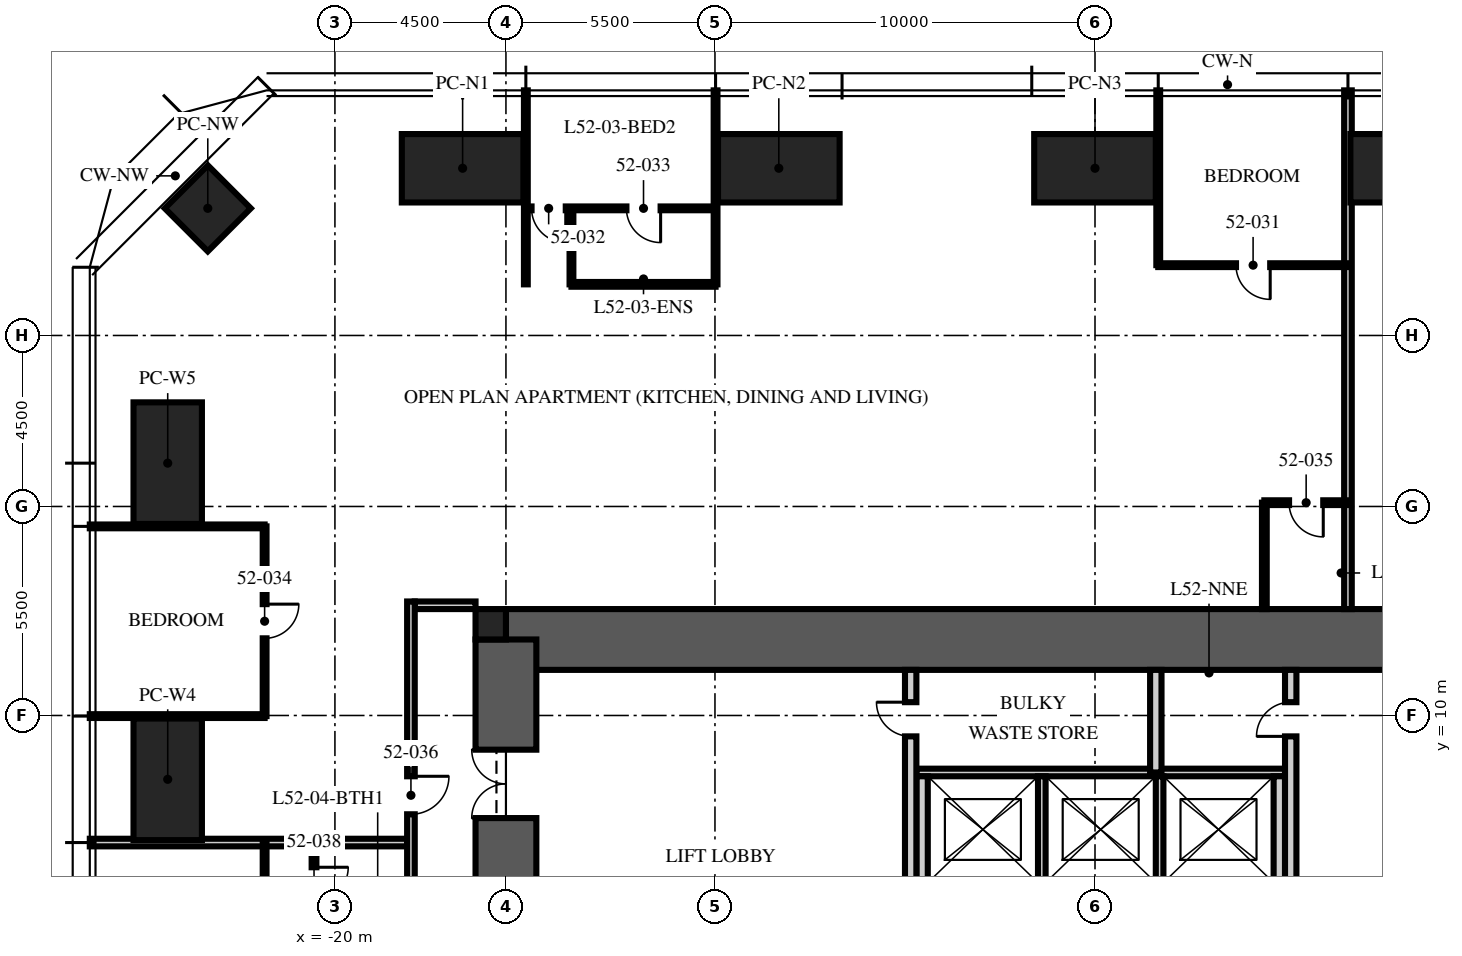
"""IFC4 building model, lengths in metres.
Left out: names, types, materials, properties, quantities, classifications, styles, units other than length and angle.
Written with IfcOpenShell. Run it as: python <this file> out.ifc"""

import sys

from ifc_helpers import new_model, si_unit, direction, frame, frame_2d, origin, origin_2d, place, context, subcontext, project, spatial, rectangle, hollow_rectangle, extrude, element, fill, save


model = new_model("IFC4")
c1 = context("Model", 3, precision=1e-05, world=origin(), true_north=direction((0.0, 1.0)))
c2 = subcontext(c1, "Body", "Model", "MODEL_VIEW")
j1 = project(units=[si_unit("LENGTHUNIT", "METRE"), si_unit("PLANEANGLEUNIT", "RADIAN")], contexts=[c1])
p1 = place(None, origin())
s1 = spatial("IfcSite", under=j1, at=p1, CompositionType="ELEMENT")
p2 = place(p1, origin())
s2 = spatial("IfcBuilding", under=s1, at=p2, CompositionType="ELEMENT")
p3 = place(p2, frame((0.0, 0.0, 210.75)))
s3 = spatial("IfcBuildingStorey", under=s2, at=p3, CompositionType="ELEMENT", Elevation=210.75)
p4 = place(p3, frame((-15.5, 12.0, -0.25), z_axis=(0.0, 0.0, 1.0), x_axis=(1.0, 0.0, 0.0)))
e1 = element("IfcWall", 1, at=p4, inside=s3, PredefinedType="SHEAR", context=c2, shape_type="SweptSolid", body=[
    extrude(rectangle(XDim=31.0, YDim=1.6, at=frame_2d((15.5, 0.0))), origin(), (0.0, 0.0, 1.0), 3.75),
])
p5 = place(p3, frame((-15.5, -12.0, -0.25), z_axis=(0.0, 0.0, 1.0), x_axis=(0.0, 1.0, 0.0)))
e2 = element("IfcWall", 2, at=p5, inside=s3, PredefinedType="SHEAR", context=c2, shape_type="SweptSolid", body=[
    extrude(rectangle(XDim=24.0, YDim=1.6, at=frame_2d((12.0, 0.0))), origin(), (0.0, 0.0, 1.0), 3.75),
])
p6 = place(p5, frame((3.2, 0.0, 0.25)))
e3 = element("IfcOpeningElement", 3, at=p6, cuts=e2, PredefinedType="OPENING", context=c2, shape_type="SweptSolid", body=[
    extrude(rectangle(XDim=1.2, YDim=2.1, at=frame_2d((0.6, 1.05))), frame((0.0, 0.81, 0.0), z_axis=(0.0, -1.0, 0.0), x_axis=(1.0, 0.0, 0.0)), (0.0, 0.0, 1.0), 1.62),
])
p7 = place(p5, frame((19.3, 0.0, 0.25)))
e4 = element("IfcOpeningElement", 4, at=p7, cuts=e2, PredefinedType="OPENING", context=c2, shape_type="SweptSolid", body=[
    extrude(rectangle(XDim=1.8, YDim=2.1, at=frame_2d((0.9, 1.05))), frame((0.0, 0.81, 0.0), z_axis=(0.0, -1.0, 0.0), x_axis=(1.0, 0.0, 0.0)), (0.0, 0.0, 1.0), 1.62),
])
p8 = place(p3, frame((-15.9, 12.4, -0.25), z_axis=(0.0, 0.0, 1.0), x_axis=(1.0, 0.0, 0.0)))
e5 = element("IfcColumn", 5, at=p8, inside=s3, PredefinedType="COLUMN", context=c2, shape_type="SweptSolid", body=[
    extrude(rectangle(XDim=0.8, YDim=0.8, at=origin_2d()), origin(), (0.0, 0.0, 1.0), 3.75),
])
for number, where, z_axis, x_axis in (
    (6, (-16.64, 24.4, 0.0), (0.0, 0.0, 1.0), (1.0, 0.0, 0.0)),
    (7, (-8.32, 24.4, 0.0), (0.0, 0.0, 1.0), (1.0, 0.0, 0.0)),
    (8, (0.0, 24.4, 0.0), (0.0, 0.0, 1.0), (1.0, 0.0, 0.0)),
    (9, (8.32, 24.4, 0.0), (0.0, 0.0, 1.0), (1.0, 0.0, 0.0)),
    (10, (-24.4, 8.32, 0.0), (0.0, 0.0, 1.0), (0.0, 1.0, 0.0)),
    (11, (-24.4, 16.64, 0.0), (0.0, 0.0, 1.0), (0.0, 1.0, 0.0)),
):
    element("IfcColumn", number, at=place(p3, frame(where, z_axis=z_axis, x_axis=x_axis)), inside=s3, PredefinedType="COLUMN", context=c2, shape_type="SweptSolid", body=[
        extrude(hollow_rectangle(XDim=3.2, YDim=1.8, WallThickness=0.2, at=origin_2d()), origin(), (0.0, 0.0, 1.0), 3.75),
    ])
p9 = place(p3, frame((-23.346, 23.346, 0.0), z_axis=(0.0, 0.0, 1.0), x_axis=(0.707106781187, 0.707106781187, 0.0)))
e12 = element("IfcColumn", 12, at=p9, inside=s3, PredefinedType="COLUMN", context=c2, shape_type="SweptSolid", body=[
    extrude(hollow_rectangle(XDim=1.6, YDim=1.6, WallThickness=0.1, at=origin_2d()), origin(), (0.0, 0.0, 1.0), 3.75),
])
p10 = place(p3, frame((-4.7, 8.5, 0.0), z_axis=(0.0, 0.0, 1.0), x_axis=(1.0, 0.0, 0.0)))
e13 = element("IfcWall", 13, at=p10, inside=s3, PredefinedType="PARTITIONING", context=c2, shape_type="SweptSolid", body=[
    extrude(rectangle(XDim=9.7, YDim=0.2, at=frame_2d((4.85, 0.0))), origin(), (0.0, 0.0, 1.0), 3.5),
])
for number, where, z_axis, x_axis in (
    (14, (-4.55, 5.6, 0.0), (0.0, 0.0, 1.0), (0.0, 1.0, 0.0)),
    (15, (4.85, 5.6, 0.0), (0.0, 0.0, 1.0), (0.0, 1.0, 0.0)),
):
    element("IfcWall", number, at=place(p3, frame(where, z_axis=z_axis, x_axis=x_axis)), inside=s3, PredefinedType="PARTITIONING", context=c2, shape_type="SweptSolid", body=[
        extrude(rectangle(XDim=2.8, YDim=0.3, at=frame_2d((1.4, 0.0))), origin(), (0.0, 0.0, 1.0), 3.5),
    ])
for number, where, z_axis, x_axis in (
    (16, (-1.4, 5.6, 0.0), (0.0, 0.0, 1.0), (0.0, 1.0, 0.0)),
    (17, (1.7, 5.6, 0.0), (0.0, 0.0, 1.0), (0.0, 1.0, 0.0)),
):
    element("IfcWall", number, at=place(p3, frame(where, z_axis=z_axis, x_axis=x_axis)), inside=s3, PredefinedType="PARTITIONING", context=c2, shape_type="SweptSolid", body=[
        extrude(rectangle(XDim=2.8, YDim=0.2, at=frame_2d((1.4, 0.0))), origin(), (0.0, 0.0, 1.0), 3.5),
    ])
p11 = place(p3, frame((-4.85, 5.3, 0.0), z_axis=(0.0, 0.0, 1.0), x_axis=(0.0, 1.0, 0.0)))
e18 = element("IfcWall", 18, at=p11, inside=s3, PredefinedType="PARTITIONING", context=c2, shape_type="SweptSolid", body=[
    extrude(rectangle(XDim=5.9, YDim=0.3, at=frame_2d((2.95, 0.0))), origin(), (0.0, 0.0, 1.0), 3.5),
])
p12 = place(p11, frame((4.15, 0.0, 0.0)))
e19 = element("IfcOpeningElement", 19, at=p12, cuts=e18, PredefinedType="OPENING", context=c2, shape_type="SweptSolid", body=[
    extrude(rectangle(XDim=0.9, YDim=2.1, at=frame_2d((0.45, 1.05))), frame((0.0, 0.16, 0.0), z_axis=(0.0, -1.0, 0.0), x_axis=(1.0, 0.0, 0.0)), (0.0, 0.0, 1.0), 0.32),
])
p13 = place(p3, frame((5.15, 5.3, 0.0), z_axis=(0.0, 0.0, 1.0), x_axis=(0.0, 1.0, 0.0)))
e20 = element("IfcWall", 20, at=p13, inside=s3, PredefinedType="PARTITIONING", context=c2, shape_type="SweptSolid", body=[
    extrude(rectangle(XDim=5.9, YDim=0.3, at=frame_2d((2.95, 0.0))), origin(), (0.0, 0.0, 1.0), 3.5),
])
p14 = place(p13, frame((4.15, 0.0, 0.0)))
e21 = element("IfcOpeningElement", 21, at=p14, cuts=e20, PredefinedType="OPENING", context=c2, shape_type="SweptSolid", body=[
    extrude(rectangle(XDim=0.9, YDim=2.1, at=frame_2d((0.45, 1.05))), frame((0.0, 0.16, 0.0), z_axis=(0.0, -1.0, 0.0), x_axis=(1.0, 0.0, 0.0)), (0.0, 0.0, 1.0), 0.32),
])
p15 = place(p3, frame((1.6, 8.5, 0.0), z_axis=(0.0, 0.0, 1.0), x_axis=(0.0, 1.0, 0.0)))
e22 = element("IfcWall", 22, at=p15, inside=s3, PredefinedType="PARTITIONING", context=c2, shape_type="SweptSolid", body=[
    extrude(rectangle(XDim=2.7, YDim=0.3, at=frame_2d((1.35, 0.0))), origin(), (0.0, 0.0, 1.0), 3.5),
])
p16 = place(p3, frame((-16.3, 12.9, 0.0), z_axis=(0.0, 0.0, 1.0), x_axis=(-1.0, 0.0, 0.0)))
e23 = element("IfcWall", 23, at=p16, inside=s3, PredefinedType="PARTITIONING", context=c2, shape_type="SweptSolid", body=[
    extrude(rectangle(XDim=1.6, YDim=0.2, at=frame_2d((0.8, 0.0))), origin(), (0.0, 0.0, 1.0), 2.3),
])
p17 = place(p3, frame((6.656, 12.8, 0.0), z_axis=(0.0, 0.0, 1.0), x_axis=(0.0, 1.0, 0.0)))
e24 = element("IfcWall", 24, at=p17, inside=s3, PredefinedType="PARTITIONING", context=c2, shape_type="SweptSolid", body=[
    extrude(rectangle(XDim=13.65, YDim=0.2, at=frame_2d((6.825, 0.0))), origin(), (0.0, 0.0, 1.0), 2.91),
])
p18 = place(p3, frame((1.664, 21.85, 0.0), z_axis=(0.0, 0.0, 1.0), x_axis=(0.0, 1.0, 0.0)))
e25 = element("IfcWall", 25, at=p18, inside=s3, PredefinedType="PARTITIONING", context=c2, shape_type="SweptSolid", body=[
    extrude(rectangle(XDim=4.6, YDim=0.1, at=frame_2d((2.3, 0.0))), origin(), (0.0, 0.0, 1.0), 2.91),
])
for number, where, z_axis, x_axis in (
    (26, (-9.984, 21.345, 0.0), (0.0, 0.0, 1.0), (0.0, 1.0, 0.0)),
    (27, (-14.976, 21.345, 0.0), (0.0, 0.0, 1.0), (0.0, 1.0, 0.0)),
):
    element("IfcWall", number, at=place(p3, frame(where, z_axis=z_axis, x_axis=x_axis)), inside=s3, PredefinedType="PARTITIONING", context=c2, shape_type="SweptSolid", body=[
        extrude(rectangle(XDim=5.105, YDim=0.1, at=frame_2d((2.552, 0.0))), origin(), (0.0, 0.0, 1.0), 2.91),
    ])
for number, where, z_axis, x_axis in (
    (28, (-21.85, 14.976, 0.0), (0.0, 0.0, 1.0), (-1.0, 0.0, 0.0)),
    (29, (-21.85, 9.984, 0.0), (0.0, 0.0, 1.0), (-1.0, 0.0, 0.0)),
):
    element("IfcWall", number, at=place(p3, frame(where, z_axis=z_axis, x_axis=x_axis)), inside=s3, PredefinedType="PARTITIONING", context=c2, shape_type="SweptSolid", body=[
        extrude(rectangle(XDim=4.6, YDim=0.1, at=frame_2d((2.3, 0.0))), origin(), (0.0, 0.0, 1.0), 2.91),
    ])
p19 = place(p3, frame((-18.1, 6.656, 0.0), z_axis=(0.0, 0.0, 1.0), x_axis=(-1.0, 0.0, 0.0)))
e30 = element("IfcWall", 30, at=p19, inside=s3, PredefinedType="PARTITIONING", context=c2, shape_type="SweptSolid", body=[
    extrude(rectangle(XDim=8.35, YDim=0.2, at=frame_2d((4.175, 0.0))), origin(), (0.0, 0.0, 1.0), 2.91),
])
p20 = place(p3, frame((6.656, 21.85, 0.0), z_axis=(0.0, 0.0, 1.0), x_axis=(-1.0, 0.0, 0.0)))
e31 = element("IfcWall", 31, at=p20, inside=s3, PredefinedType="PARTITIONING", context=c2, shape_type="SweptSolid", body=[
    extrude(rectangle(XDim=4.992, YDim=0.1, at=frame_2d((2.496, 0.0))), origin(), (0.0, 0.0, 1.0), 2.81),
])
p21 = place(p20, frame((2.046, 0.0, 0.0)))
e32 = element("IfcOpeningElement", 32, at=p21, cuts=e31, PredefinedType="OPENING", context=c2, shape_type="SweptSolid", body=[
    extrude(rectangle(XDim=0.9, YDim=2.1, at=frame_2d((0.45, 1.05))), frame((0.0, 0.06, 0.0), z_axis=(0.0, -1.0, 0.0), x_axis=(1.0, 0.0, 0.0)), (0.0, 0.0, 1.0), 0.12),
])
p22 = place(p3, frame((-9.984, 23.345, 0.0), z_axis=(0.0, 0.0, 1.0), x_axis=(-1.0, 0.0, 0.0)))
e33 = element("IfcWall", 33, at=p22, inside=s3, PredefinedType="PARTITIONING", context=c2, shape_type="SweptSolid", body=[
    extrude(rectangle(XDim=4.992, YDim=0.1, at=frame_2d((2.496, 0.0))), origin(), (0.0, 0.0, 1.0), 2.81),
])
p23 = place(p22, frame((3.942, 0.0, 0.0)))
e34 = element("IfcOpeningElement", 34, at=p23, cuts=e33, PredefinedType="OPENING", context=c2, shape_type="SweptSolid", body=[
    extrude(rectangle(XDim=0.9, YDim=2.1, at=frame_2d((0.45, 1.05))), frame((0.0, 0.06, 0.0), z_axis=(0.0, -1.0, 0.0), x_axis=(1.0, 0.0, 0.0)), (0.0, 0.0, 1.0), 0.12),
])
p24 = place(p22, frame((1.446, 0.0, 0.0)))
e35 = element("IfcOpeningElement", 35, at=p24, cuts=e33, PredefinedType="OPENING", context=c2, shape_type="SweptSolid", body=[
    extrude(rectangle(XDim=0.9, YDim=2.1, at=frame_2d((0.45, 1.05))), frame((0.0, 0.06, 0.0), z_axis=(0.0, -1.0, 0.0), x_axis=(1.0, 0.0, 0.0)), (0.0, 0.0, 1.0), 0.12),
])
p25 = place(p3, frame((-13.776, 21.345, 0.0), z_axis=(0.0, 0.0, 1.0), x_axis=(0.0, 1.0, 0.0)))
e36 = element("IfcWall", 36, at=p25, inside=s3, PredefinedType="PARTITIONING", context=c2, shape_type="SweptSolid", body=[
    extrude(rectangle(XDim=2.0, YDim=0.1, at=frame_2d((1.0, 0.0))), origin(), (0.0, 0.0, 1.0), 3.5),
])
p26 = place(p3, frame((-9.984, 21.345, 0.0), z_axis=(0.0, 0.0, 1.0), x_axis=(-1.0, 0.0, 0.0)))
e37 = element("IfcWall", 37, at=p26, inside=s3, PredefinedType="PARTITIONING", context=c2, shape_type="SweptSolid", body=[
    extrude(rectangle(XDim=3.792, YDim=0.125, at=frame_2d((1.896, 0.0))), origin(), (0.0, 0.0, 1.0), 2.81),
])
p27 = place(p3, frame((-21.85, 14.976, 0.0), z_axis=(0.0, 0.0, 1.0), x_axis=(0.0, -1.0, 0.0)))
e38 = element("IfcWall", 38, at=p27, inside=s3, PredefinedType="PARTITIONING", context=c2, shape_type="SweptSolid", body=[
    extrude(rectangle(XDim=4.992, YDim=0.1, at=frame_2d((2.496, 0.0))), origin(), (0.0, 0.0, 1.0), 2.81),
])
p28 = place(p27, frame((2.046, 0.0, 0.0)))
e39 = element("IfcOpeningElement", 39, at=p28, cuts=e38, PredefinedType="OPENING", context=c2, shape_type="SweptSolid", body=[
    extrude(rectangle(XDim=0.9, YDim=2.1, at=frame_2d((0.45, 1.05))), frame((0.0, 0.06, 0.0), z_axis=(0.0, -1.0, 0.0), x_axis=(1.0, 0.0, 0.0)), (0.0, 0.0, 1.0), 0.12),
])
p29 = place(p3, frame((6.656, 15.6, 0.0), z_axis=(0.0, 0.0, 1.0), x_axis=(-1.0, 0.0, 0.0)))
e40 = element("IfcWall", 40, at=p29, inside=s3, PredefinedType="PARTITIONING", context=c2, shape_type="SweptSolid", body=[
    extrude(rectangle(XDim=2.2, YDim=0.125, at=frame_2d((1.1, 0.0))), origin(), (0.0, 0.0, 1.0), 3.5),
])
p30 = place(p29, frame((0.65, 0.0, 0.0)))
e41 = element("IfcOpeningElement", 41, at=p30, cuts=e40, PredefinedType="OPENING", context=c2, shape_type="SweptSolid", body=[
    extrude(rectangle(XDim=0.9, YDim=2.1, at=frame_2d((0.45, 1.05))), frame((0.0, 0.073, 0.0), z_axis=(0.0, -1.0, 0.0), x_axis=(1.0, 0.0, 0.0)), (0.0, 0.0, 1.0), 0.145),
])
p31 = place(p3, frame((4.456, 12.8, 0.0), z_axis=(0.0, 0.0, 1.0), x_axis=(0.0, 1.0, 0.0)))
e42 = element("IfcWall", 42, at=p31, inside=s3, PredefinedType="PARTITIONING", context=c2, shape_type="SweptSolid", body=[
    extrude(rectangle(XDim=2.8, YDim=0.125, at=frame_2d((1.4, 0.0))), origin(), (0.0, 0.0, 1.0), 3.5),
])
p32 = place(p3, frame((-21.85, 6.656, 0.0), z_axis=(0.0, 0.0, 1.0), x_axis=(0.0, -1.0, 0.0)))
e43 = element("IfcWall", 43, at=p32, inside=s3, PredefinedType="PARTITIONING", context=c2, shape_type="SweptSolid", body=[
    extrude(rectangle(XDim=4.992, YDim=0.1, at=frame_2d((2.496, 0.0))), origin(), (0.0, 0.0, 1.0), 2.81),
])
p33 = place(p32, frame((2.046, 0.0, 0.0)))
e44 = element("IfcOpeningElement", 44, at=p33, cuts=e43, PredefinedType="OPENING", context=c2, shape_type="SweptSolid", body=[
    extrude(rectangle(XDim=0.9, YDim=2.1, at=frame_2d((0.45, 1.05))), frame((0.0, 0.06, 0.0), z_axis=(0.0, -1.0, 0.0), x_axis=(1.0, 0.0, 0.0)), (0.0, 0.0, 1.0), 0.12),
])
p34 = place(p3, frame((-20.55, 6.656, 0.0), z_axis=(0.0, 0.0, 1.0), x_axis=(0.0, -1.0, 0.0)))
e45 = element("IfcWall", 45, at=p34, inside=s3, PredefinedType="PARTITIONING", context=c2, shape_type="SweptSolid", body=[
    extrude(rectangle(XDim=2.2, YDim=0.125, at=frame_2d((1.1, 0.0))), origin(), (0.0, 0.0, 1.0), 3.5),
])
p35 = place(p34, frame((0.65, 0.0, 0.0)))
e46 = element("IfcOpeningElement", 46, at=p35, cuts=e45, PredefinedType="OPENING", context=c2, shape_type="SweptSolid", body=[
    extrude(rectangle(XDim=0.9, YDim=2.1, at=frame_2d((0.45, 1.05))), frame((0.0, 0.073, 0.0), z_axis=(0.0, -1.0, 0.0), x_axis=(1.0, 0.0, 0.0)), (0.0, 0.0, 1.0), 0.145),
])
p36 = place(p3, frame((-18.0, 13.0, 0.0), z_axis=(0.0, 0.0, 1.0), x_axis=(0.0, -1.0, 0.0)))
e47 = element("IfcWall", 47, at=p36, inside=s3, PredefinedType="PARTITIONING", context=c2, shape_type="SweptSolid", body=[
    extrude(rectangle(XDim=26.0, YDim=0.2, at=frame_2d((13.0, 0.0))), origin(), (0.0, 0.0, 1.0), 2.6),
])
p37 = place(p36, frame((4.6, 0.0, 0.0)))
e48 = element("IfcOpeningElement", 48, at=p37, cuts=e47, PredefinedType="OPENING", context=c2, shape_type="SweptSolid", body=[
    extrude(rectangle(XDim=1.0, YDim=2.2, at=frame_2d((0.5, 1.1))), frame((0.0, 0.11, 0.0), z_axis=(0.0, -1.0, 0.0), x_axis=(1.0, 0.0, 0.0)), (0.0, 0.0, 1.0), 0.22),
])
p38 = place(p36, frame((18.114, 0.0, 0.0)))
e49 = element("IfcOpeningElement", 49, at=p38, cuts=e47, PredefinedType="OPENING", context=c2, shape_type="SweptSolid", body=[
    extrude(rectangle(XDim=1.0, YDim=2.2, at=frame_2d((0.5, 1.1))), frame((0.0, 0.11, 0.0), z_axis=(0.0, -1.0, 0.0), x_axis=(1.0, 0.0, 0.0)), (0.0, 0.0, 1.0), 0.22),
])
p39 = place(p36, frame((23.676, 0.0, 0.0)))
e50 = element("IfcOpeningElement", 50, at=p39, cuts=e47, PredefinedType="OPENING", context=c2, shape_type="SweptSolid", body=[
    extrude(rectangle(XDim=1.0, YDim=2.2, at=frame_2d((0.5, 1.1))), frame((0.0, 0.11, 0.0), z_axis=(0.0, -1.0, 0.0), x_axis=(1.0, 0.0, 0.0)), (0.0, 0.0, 1.0), 0.22),
])
p40 = place(p7, origin())
e51 = element("IfcDoor", 51, at=p40, inside=s3, OperationType="DOUBLE_DOOR_SINGLE_SWING", PredefinedType="DOOR", context=c2, shape_type="SweptSolid", body=[
    extrude(rectangle(XDim=1.8, YDim=2.1, at=frame_2d((0.9, 1.05))), frame((0.0, 0.025, 0.0), z_axis=(0.0, -1.0, 0.0), x_axis=(1.0, 0.0, 0.0)), (0.0, 0.0, 1.0), 0.05),
])
fill(e4, e51)
p41 = place(p12, origin())
e52 = element("IfcDoor", 52, at=p41, inside=s3, OperationType="SINGLE_SWING_RIGHT", PredefinedType="DOOR", context=c2, shape_type="SweptSolid", body=[
    extrude(rectangle(XDim=0.9, YDim=2.1, at=frame_2d((0.45, 1.05))), frame((0.0, 0.025, 0.0), z_axis=(0.0, -1.0, 0.0), x_axis=(1.0, 0.0, 0.0)), (0.0, 0.0, 1.0), 0.05),
])
fill(e19, e52)
p42 = place(p14, origin())
e53 = element("IfcDoor", 53, at=p42, inside=s3, OperationType="SINGLE_SWING_LEFT", PredefinedType="DOOR", context=c2, shape_type="SweptSolid", body=[
    extrude(rectangle(XDim=0.9, YDim=2.1, at=frame_2d((0.45, 1.05))), frame((0.0, 0.025, 0.0), z_axis=(0.0, -1.0, 0.0), x_axis=(1.0, 0.0, 0.0)), (0.0, 0.0, 1.0), 0.05),
])
fill(e21, e53)
p43 = place(p21, origin())
e54 = element("IfcDoor", 54, at=p43, inside=s3, OperationType="SINGLE_SWING_LEFT", PredefinedType="DOOR", context=c2, shape_type="SweptSolid", body=[
    extrude(rectangle(XDim=0.9, YDim=2.1, at=frame_2d((0.45, 1.05))), frame((0.0, 0.025, 0.0), z_axis=(0.0, -1.0, 0.0), x_axis=(1.0, 0.0, 0.0)), (0.0, 0.0, 1.0), 0.05),
])
fill(e32, e54)
p44 = place(p23, origin())
e55 = element("IfcDoor", 55, at=p44, inside=s3, OperationType="SINGLE_SWING_LEFT", PredefinedType="DOOR", context=c2, shape_type="SweptSolid", body=[
    extrude(rectangle(XDim=0.9, YDim=2.1, at=frame_2d((0.45, 1.05))), frame((0.0, 0.025, 0.0), z_axis=(0.0, -1.0, 0.0), x_axis=(1.0, 0.0, 0.0)), (0.0, 0.0, 1.0), 0.05),
])
fill(e34, e55)
p45 = place(p24, origin())
e56 = element("IfcDoor", 56, at=p45, inside=s3, OperationType="SINGLE_SWING_LEFT", PredefinedType="DOOR", context=c2, shape_type="SweptSolid", body=[
    extrude(rectangle(XDim=0.9, YDim=2.1, at=frame_2d((0.45, 1.05))), frame((0.0, 0.025, 0.0), z_axis=(0.0, -1.0, 0.0), x_axis=(1.0, 0.0, 0.0)), (0.0, 0.0, 1.0), 0.05),
])
fill(e35, e56)
p46 = place(p28, origin())
e57 = element("IfcDoor", 57, at=p46, inside=s3, OperationType="SINGLE_SWING_LEFT", PredefinedType="DOOR", context=c2, shape_type="SweptSolid", body=[
    extrude(rectangle(XDim=0.9, YDim=2.1, at=frame_2d((0.45, 1.05))), frame((0.0, 0.025, 0.0), z_axis=(0.0, -1.0, 0.0), x_axis=(1.0, 0.0, 0.0)), (0.0, 0.0, 1.0), 0.05),
])
fill(e39, e57)
p47 = place(p30, origin())
e58 = element("IfcDoor", 58, at=p47, inside=s3, OperationType="SINGLE_SWING_LEFT", PredefinedType="DOOR", context=c2, shape_type="SweptSolid", body=[
    extrude(rectangle(XDim=0.9, YDim=2.1, at=frame_2d((0.45, 1.05))), frame((0.0, 0.025, 0.0), z_axis=(0.0, -1.0, 0.0), x_axis=(1.0, 0.0, 0.0)), (0.0, 0.0, 1.0), 0.05),
])
fill(e41, e58)
p48 = place(p37, origin())
e59 = element("IfcDoor", 59, at=p48, inside=s3, OperationType="SINGLE_SWING_LEFT", PredefinedType="DOOR", context=c2, shape_type="SweptSolid", body=[
    extrude(rectangle(XDim=1.0, YDim=2.2, at=frame_2d((0.5, 1.1))), frame((0.0, 0.025, 0.0), z_axis=(0.0, -1.0, 0.0), x_axis=(1.0, 0.0, 0.0)), (0.0, 0.0, 1.0), 0.05),
])
fill(e48, e59)
p49 = place(p35, origin())
e60 = element("IfcDoor", 60, at=p49, inside=s3, OperationType="SINGLE_SWING_LEFT", PredefinedType="DOOR", context=c2, shape_type="SweptSolid", body=[
    extrude(rectangle(XDim=0.9, YDim=2.1, at=frame_2d((0.45, 1.05))), frame((0.0, 0.025, 0.0), z_axis=(0.0, -1.0, 0.0), x_axis=(1.0, 0.0, 0.0)), (0.0, 0.0, 1.0), 0.05),
])
fill(e46, e60)
save(model, sys.argv[1])
